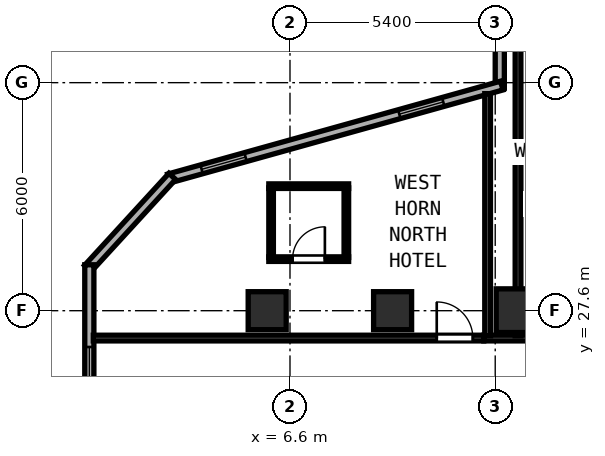
"""IFC4 building model, lengths in metres.
Left out: names, types, materials, properties, quantities, classifications, styles, units other than length and angle.
Written with IfcOpenShell. Run it as: python <this file> out.ifc"""

import sys

from ifc_helpers import new_model, si_unit, direction, frame, frame_2d, origin, origin_2d, place, context, subcontext, project, spatial, rectangle, hollow_rectangle, extrude, element, fill, save


model = new_model("IFC4")
c1 = context("Model", 3, precision=1e-05, world=origin(), true_north=direction((0.0, 1.0)))
c2 = subcontext(c1, "Body", "Model", "MODEL_VIEW")
j1 = project(units=[si_unit("LENGTHUNIT", "METRE"), si_unit("PLANEANGLEUNIT", "RADIAN")], contexts=[c1])
p1 = place(None, origin())
s1 = spatial("IfcSite", under=j1, at=p1, CompositionType="ELEMENT")
p2 = place(p1, origin())
s2 = spatial("IfcBuilding", under=s1, at=p2, CompositionType="ELEMENT")
p3 = place(p2, frame((0.0, 0.0, 70.4)))
s3 = spatial("IfcBuildingStorey", under=s2, at=p3, CompositionType="ELEMENT", Elevation=70.4)
p4 = place(p3, frame((12.6, 27.6, 0.0), z_axis=(0.0, 0.0, 1.0), x_axis=(1.0, 0.0, 0.0)))
e1 = element("IfcColumn", 1, at=p4, inside=s3, PredefinedType="COLUMN", context=c2, shape_type="SweptSolid", body=[
    extrude(hollow_rectangle(XDim=1.15, YDim=1.15, WallThickness=0.042, at=origin_2d()), origin(), (0.0, 0.0, 1.0), 3.8),
])
for number, where, z_axis, x_axis in (
    (2, (6.0, 27.6, 0.0), (0.0, 0.0, 1.0), (1.0, 0.0, 0.0)),
    (3, (9.3, 27.6, 0.0), (0.0, 0.0, 1.0), (1.0, 0.0, 0.0)),
):
    element("IfcColumn", number, at=place(p3, frame(where, z_axis=z_axis, x_axis=x_axis)), inside=s3, PredefinedType="COLUMN", context=c2, shape_type="SweptSolid", body=[
        extrude(hollow_rectangle(XDim=1.0, YDim=1.0, WallThickness=0.038, at=origin_2d()), origin(), (0.0, 0.0, 1.0), 3.8),
    ])
p5 = place(p3, frame((12.12, 37.535, 0.0), z_axis=(0.0, 0.0, 1.0), x_axis=(0.0, -1.0, 0.0)))
e4 = element("IfcWall", 4, at=p5, inside=s3, PredefinedType="SOLIDWALL", context=c2, shape_type="SweptSolid", body=[
    extrude(rectangle(XDim=4.081, YDim=0.24, at=frame_2d((2.041, 0.0))), origin(), (0.0, 0.0, 1.0), 3.6),
])
p6 = place(p5, frame((1.6, 0.0, 0.85)))
e5 = element("IfcOpeningElement", 5, at=p6, cuts=e4, PredefinedType="OPENING", context=c2, shape_type="SweptSolid", body=[
    extrude(rectangle(XDim=1.2, YDim=1.85, at=frame_2d((0.6, 0.925))), frame((0.0, 0.13, 0.0), z_axis=(0.0, -1.0, 0.0), x_axis=(1.0, 0.0, 0.0)), (0.0, 0.0, 1.0), 0.26),
])
p7 = place(p3, frame((12.173, 33.524, 0.0), z_axis=(0.0, 0.0, 1.0), x_axis=(-0.963197271032, -0.268795493036, 0.0)))
e6 = element("IfcWall", 6, at=p7, inside=s3, PredefinedType="SOLIDWALL", context=c2, shape_type="SweptSolid", body=[
    extrude(rectangle(XDim=9.095, YDim=0.24, at=frame_2d((4.548, 0.0))), origin(), (0.0, 0.0, 1.0), 3.6),
])
p8 = place(p7, frame((1.6, 0.0, 0.85)))
e7 = element("IfcOpeningElement", 7, at=p8, cuts=e6, PredefinedType="OPENING", context=c2, shape_type="SweptSolid", body=[
    extrude(rectangle(XDim=1.2, YDim=1.85, at=frame_2d((0.6, 0.925))), frame((0.0, 0.13, 0.0), z_axis=(0.0, -1.0, 0.0), x_axis=(1.0, 0.0, 0.0)), (0.0, 0.0, 1.0), 0.26),
])
p9 = place(p7, frame((7.0, 0.0, 0.85)))
e8 = element("IfcOpeningElement", 8, at=p9, cuts=e6, PredefinedType="OPENING", context=c2, shape_type="SweptSolid", body=[
    extrude(rectangle(XDim=1.2, YDim=1.85, at=frame_2d((0.6, 0.925))), frame((0.0, 0.13, 0.0), z_axis=(0.0, -1.0, 0.0), x_axis=(1.0, 0.0, 0.0)), (0.0, 0.0, 1.0), 0.26),
])
p10 = place(p3, frame((3.502, 31.134, 0.0), z_axis=(0.0, 0.0, 1.0), x_axis=(-0.675781844312, -0.737101688302, 0.0)))
e9 = element("IfcWall", 9, at=p10, inside=s3, PredefinedType="SOLIDWALL", context=c2, shape_type="SweptSolid", body=[
    extrude(rectangle(XDim=3.285, YDim=0.24, at=frame_2d((1.642, 0.0))), origin(), (0.0, 0.0, 1.0), 3.6),
])
p11 = place(p3, frame((1.32, 28.808, 0.0), z_axis=(0.0, 0.0, 1.0), x_axis=(0.0, -1.0, 0.0)))
e10 = element("IfcWall", 10, at=p11, inside=s3, PredefinedType="SOLIDWALL", context=c2, shape_type="SweptSolid", body=[
    extrude(rectangle(XDim=20.943, YDim=0.24, at=frame_2d((10.472, 0.0))), origin(), (0.0, 0.0, 1.0), 3.6),
])
p12 = place(p11, frame((2.163, 0.0, 0.85)))
e11 = element("IfcOpeningElement", 11, at=p12, cuts=e10, PredefinedType="OPENING", context=c2, shape_type="SweptSolid", body=[
    extrude(rectangle(XDim=1.2, YDim=1.85, at=frame_2d((0.6, 0.925))), frame((0.0, 0.13, 0.0), z_axis=(0.0, -1.0, 0.0), x_axis=(1.0, 0.0, 0.0)), (0.0, 0.0, 1.0), 0.26),
])
p13 = place(p11, frame((7.0, 0.0, 0.85)))
e12 = element("IfcOpeningElement", 12, at=p13, cuts=e10, PredefinedType="OPENING", context=c2, shape_type="SweptSolid", body=[
    extrude(rectangle(XDim=1.2, YDim=1.85, at=frame_2d((0.6, 0.925))), frame((0.0, 0.13, 0.0), z_axis=(0.0, -1.0, 0.0), x_axis=(1.0, 0.0, 0.0)), (0.0, 0.0, 1.0), 0.26),
])
p14 = place(p11, frame((12.4, 0.0, 0.85)))
e13 = element("IfcOpeningElement", 13, at=p14, cuts=e10, PredefinedType="OPENING", context=c2, shape_type="SweptSolid", body=[
    extrude(rectangle(XDim=1.2, YDim=1.85, at=frame_2d((0.6, 0.925))), frame((0.0, 0.13, 0.0), z_axis=(0.0, -1.0, 0.0), x_axis=(1.0, 0.0, 0.0)), (0.0, 0.0, 1.0), 0.26),
])
p15 = place(p11, frame((17.8, 0.0, 0.85)))
e14 = element("IfcOpeningElement", 14, at=p15, cuts=e10, PredefinedType="OPENING", context=c2, shape_type="SweptSolid", body=[
    extrude(rectangle(XDim=1.2, YDim=1.85, at=frame_2d((0.6, 0.925))), frame((0.0, 0.13, 0.0), z_axis=(0.0, -1.0, 0.0), x_axis=(1.0, 0.0, 0.0)), (0.0, 0.0, 1.0), 0.26),
])
p16 = place(p3, frame((11.7, 26.88, 0.0), z_axis=(0.0, 0.0, 1.0), x_axis=(1.0, 0.0, 0.0)))
e15 = element("IfcWall", 15, at=p16, inside=s3, PredefinedType="PARTITIONING", context=c2, shape_type="SweptSolid", body=[
    extrude(rectangle(XDim=5.69, YDim=0.15, at=frame_2d((2.845, 0.0))), origin(), (0.0, 0.0, 1.0), 3.6),
])
p17 = place(p16, frame((4.422, 0.0, 0.0)))
e16 = element("IfcOpeningElement", 16, at=p17, cuts=e15, PredefinedType="OPENING", context=c2, shape_type="SweptSolid", body=[
    extrude(rectangle(XDim=0.95, YDim=2.18, at=frame_2d((0.475, 1.09))), frame((0.0, 0.085, 0.0), z_axis=(0.0, -1.0, 0.0), x_axis=(1.0, 0.0, 0.0)), (0.0, 0.0, 1.0), 0.17),
])
p18 = place(p3, frame((11.8, 26.94, 0.0), z_axis=(0.0, 0.0, 1.0), x_axis=(0.0, 1.0, 0.0)))
e17 = element("IfcWall", 17, at=p18, inside=s3, PredefinedType="PARTITIONING", context=c2, shape_type="SweptSolid", body=[
    extrude(rectangle(XDim=6.371, YDim=0.15, at=frame_2d((3.185, 0.0))), origin(), (0.0, 0.0, 1.0), 3.6),
])
p19 = place(p3, frame((1.425, 26.88, 0.0), z_axis=(0.0, 0.0, 1.0), x_axis=(1.0, 0.0, 0.0)))
e18 = element("IfcWall", 18, at=p19, inside=s3, PredefinedType="PARTITIONING", context=c2, shape_type="SweptSolid", body=[
    extrude(rectangle(XDim=10.273, YDim=0.15, at=frame_2d((5.136, 0.0))), origin(), (0.0, 0.0, 1.0), 3.6),
])
p20 = place(p19, frame((9.036, 0.0, 0.0)))
e19 = element("IfcOpeningElement", 19, at=p20, cuts=e18, PredefinedType="OPENING", context=c2, shape_type="SweptSolid", body=[
    extrude(rectangle(XDim=0.95, YDim=2.15, at=frame_2d((0.475, 1.075))), frame((0.0, 0.085, 0.0), z_axis=(0.0, -1.0, 0.0), x_axis=(1.0, 0.0, 0.0)), (0.0, 0.0, 1.0), 0.17),
])
p21 = place(p3, frame((12.6, 26.94, 0.0), z_axis=(0.0, 0.0, 1.0), x_axis=(0.0, 1.0, 0.0)))
e20 = element("IfcWall", 20, at=p21, inside=s3, PredefinedType="PARTITIONING", context=c2, shape_type="SweptSolid", body=[
    extrude(rectangle(XDim=7.76, YDim=0.15, at=frame_2d((3.88, 0.0))), origin(), (0.0, 0.0, 1.0), 3.097),
])
p22 = place(p3, frame((6.043, 30.877, 0.0), z_axis=(0.0, 0.0, 1.0), x_axis=(1.0, 0.0, 0.0)))
e21 = element("IfcWall", 21, at=p22, inside=s3, PredefinedType="PARTITIONING", context=c2, shape_type="SweptSolid", body=[
    extrude(rectangle(XDim=2.1, YDim=0.12, at=frame_2d((1.05, 0.0))), origin(), (0.0, 0.0, 1.0), 3.6),
])
p23 = place(p3, frame((6.043, 28.957, 0.0), z_axis=(0.0, 0.0, 1.0), x_axis=(1.0, 0.0, 0.0)))
e22 = element("IfcWall", 22, at=p23, inside=s3, PredefinedType="PARTITIONING", context=c2, shape_type="SweptSolid", body=[
    extrude(rectangle(XDim=2.1, YDim=0.12, at=frame_2d((1.05, 0.0))), origin(), (0.0, 0.0, 1.0), 3.6),
])
p24 = place(p23, frame((0.625, 0.0, 0.0)))
e23 = element("IfcOpeningElement", 23, at=p24, cuts=e22, PredefinedType="OPENING", context=c2, shape_type="SweptSolid", body=[
    extrude(rectangle(XDim=0.85, YDim=2.1, at=frame_2d((0.425, 1.05))), frame((0.0, 0.07, 0.0), z_axis=(0.0, -1.0, 0.0), x_axis=(1.0, 0.0, 0.0)), (0.0, 0.0, 1.0), 0.14),
])
for number, where, z_axis, x_axis in (
    (24, (6.103, 29.002, 0.0), (0.0, 0.0, 1.0), (0.0, 1.0, 0.0)),
    (25, (8.083, 29.002, 0.0), (0.0, 0.0, 1.0), (0.0, 1.0, 0.0)),
):
    element("IfcWall", number, at=place(p3, frame(where, z_axis=z_axis, x_axis=x_axis)), inside=s3, PredefinedType="PARTITIONING", context=c2, shape_type="SweptSolid", body=[
        extrude(rectangle(XDim=1.83, YDim=0.12, at=frame_2d((0.915, 0.0))), origin(), (0.0, 0.0, 1.0), 3.6),
    ])
p25 = place(p8, origin())
e26 = element("IfcWindow", 26, at=p25, inside=s3, PartitioningType="SINGLE_PANEL", PredefinedType="WINDOW", context=c2, shape_type="SweptSolid", body=[
    extrude(rectangle(XDim=1.2, YDim=1.85, at=frame_2d((0.6, 0.925))), frame((0.0, 0.03, 0.0), z_axis=(0.0, -1.0, 0.0), x_axis=(1.0, 0.0, 0.0)), (0.0, 0.0, 1.0), 0.06),
])
fill(e7, e26)
p26 = place(p9, origin())
e27 = element("IfcWindow", 27, at=p26, inside=s3, PartitioningType="SINGLE_PANEL", PredefinedType="WINDOW", context=c2, shape_type="SweptSolid", body=[
    extrude(rectangle(XDim=1.2, YDim=1.85, at=frame_2d((0.6, 0.925))), frame((0.0, 0.03, 0.0), z_axis=(0.0, -1.0, 0.0), x_axis=(1.0, 0.0, 0.0)), (0.0, 0.0, 1.0), 0.06),
])
fill(e8, e27)
p27 = place(p12, origin())
e28 = element("IfcWindow", 28, at=p27, inside=s3, PartitioningType="SINGLE_PANEL", PredefinedType="WINDOW", context=c2, shape_type="SweptSolid", body=[
    extrude(rectangle(XDim=1.2, YDim=1.85, at=frame_2d((0.6, 0.925))), frame((0.0, 0.03, 0.0), z_axis=(0.0, -1.0, 0.0), x_axis=(1.0, 0.0, 0.0)), (0.0, 0.0, 1.0), 0.06),
])
fill(e11, e28)
p28 = place(p20, origin())
e29 = element("IfcDoor", 29, at=p28, inside=s3, OperationType="SINGLE_SWING_LEFT", PredefinedType="DOOR", context=c2, shape_type="SweptSolid", body=[
    extrude(rectangle(XDim=0.95, YDim=2.15, at=frame_2d((0.475, 1.075))), frame((0.0, 0.025, 0.0), z_axis=(0.0, -1.0, 0.0), x_axis=(1.0, 0.0, 0.0)), (0.0, 0.0, 1.0), 0.05),
])
fill(e19, e29)
p29 = place(p24, origin())
e30 = element("IfcDoor", 30, at=p29, inside=s3, OperationType="SINGLE_SWING_RIGHT", PredefinedType="DOOR", context=c2, shape_type="SweptSolid", body=[
    extrude(rectangle(XDim=0.85, YDim=2.1, at=frame_2d((0.425, 1.05))), frame((0.0, 0.025, 0.0), z_axis=(0.0, -1.0, 0.0), x_axis=(1.0, 0.0, 0.0)), (0.0, 0.0, 1.0), 0.05),
])
fill(e23, e30)
save(model, sys.argv[1])
